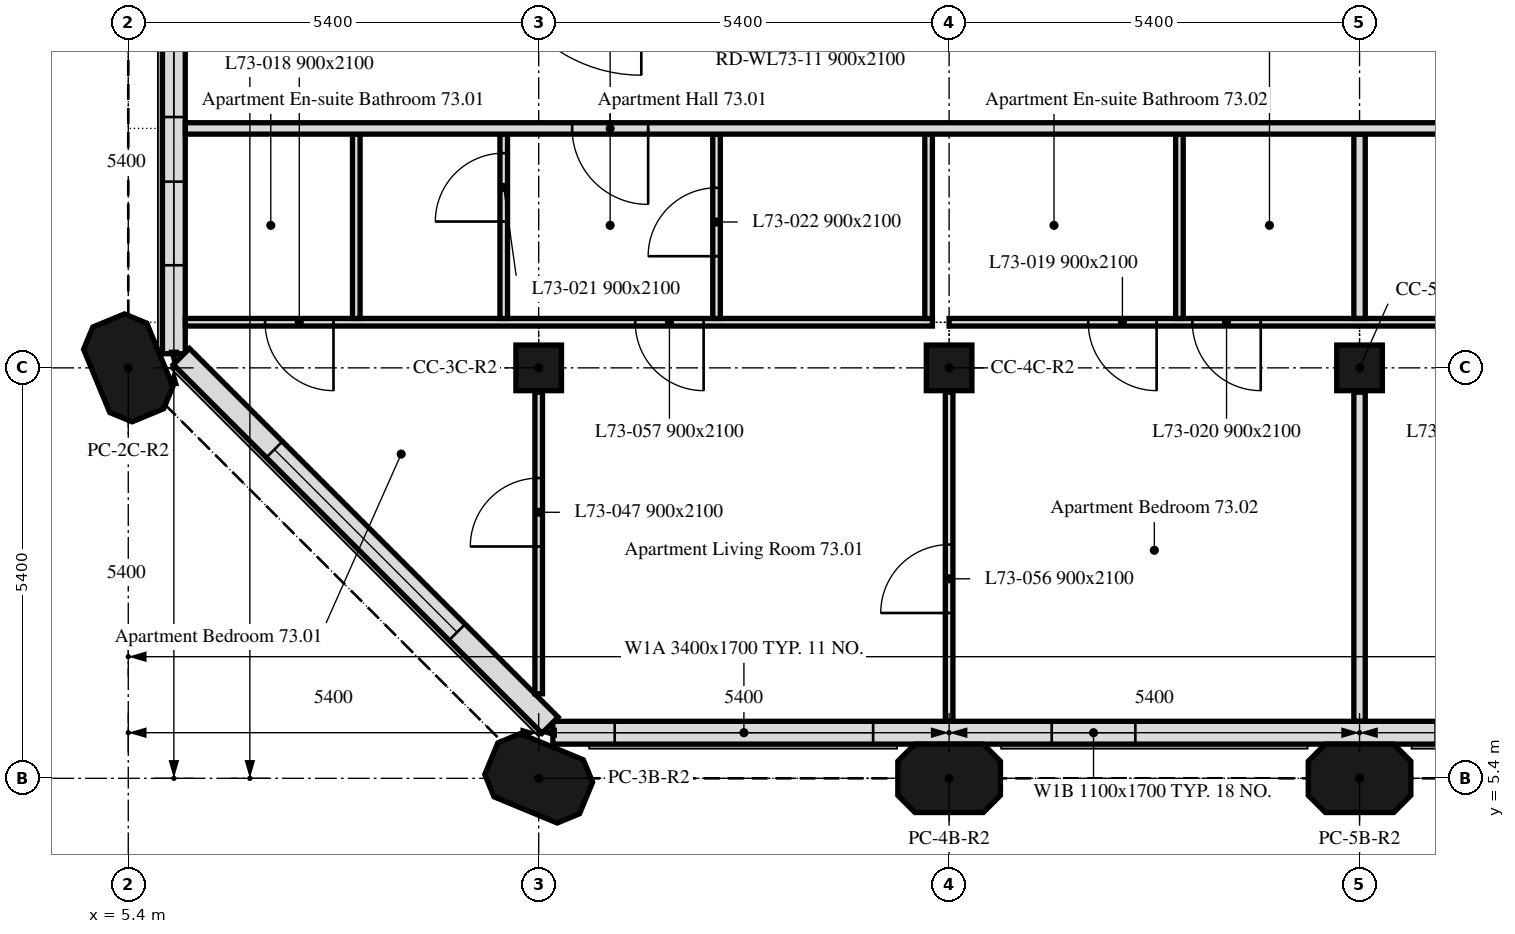
"""IFC4 building model, lengths in metres.
Left out: names, types, materials, properties, quantities, classifications, styles, units other than length and angle.
Written with IfcOpenShell. Run it as: python <this file> out.ifc"""

import sys

from ifc_helpers import new_model, si_unit, direction, frame, frame_2d, origin, origin_2d, place, context, subcontext, project, spatial, polyline, rectangle, outline, extrude, element, fill, save


model = new_model("IFC4")
c1 = context("Model", 3, precision=1e-05, world=origin(), true_north=direction((0.0, 1.0)))
c2 = subcontext(c1, "Body", "Model", "MODEL_VIEW")
j1 = project(units=[si_unit("LENGTHUNIT", "METRE"), si_unit("PLANEANGLEUNIT", "RADIAN")], contexts=[c1])
p1 = place(None, origin())
s1 = spatial("IfcSite", under=j1, at=p1, CompositionType="ELEMENT")
p2 = place(p1, origin())
s2 = spatial("IfcBuilding", under=s1, at=p2, CompositionType="ELEMENT")
p3 = place(p2, frame((0.0, 0.0, 295.0)))
s3 = spatial("IfcBuildingStorey", under=s2, at=p3, CompositionType="ELEMENT", Elevation=295.0)
for number, where, z_axis, x_axis in (
    (1, (10.8, 5.4, 0.0), (0.0, 0.0, 1.0), (-0.924, 0.383, 0.0)),
    (2, (16.2, 5.4, 0.0), (0.0, 0.0, 1.0), (1.0, 0.0, 0.0)),
    (3, (21.6, 5.4, 0.0), (0.0, 0.0, 1.0), (1.0, 0.0, 0.0)),
    (4, (5.4, 10.8, 0.0), (0.0, 0.0, 1.0), (-0.383, 0.924, 0.0)),
):
    element("IfcColumn", number, at=place(p3, frame(where, z_axis=z_axis, x_axis=x_axis)), inside=s3, PredefinedType="COLUMN", context=c2, shape_type="SweptSolid", body=[
        extrude(outline(polyline([(-0.45, -0.45), (0.45, -0.45), (0.675, -0.225), (0.675, 0.225), (0.45, 0.45), (-0.45, 0.45), (-0.675, 0.225), (-0.675, -0.225), (-0.45, -0.45)])), origin(), (0.0, 0.0, 1.0), 3.0),
    ])
for number, where, z_axis, x_axis in (
    (5, (10.8, 10.8, 0.0), (0.0, 0.0, 1.0), (1.0, 0.0, 0.0)),
    (6, (16.2, 10.8, 0.0), (0.0, 0.0, 1.0), (1.0, 0.0, 0.0)),
    (7, (21.6, 10.8, 0.0), (0.0, 0.0, 1.0), (1.0, 0.0, 0.0)),
):
    element("IfcColumn", number, at=place(p3, frame(where, z_axis=z_axis, x_axis=x_axis)), inside=s3, PredefinedType="COLUMN", context=c2, shape_type="SweptSolid", body=[
        extrude(rectangle(XDim=0.6, YDim=0.6, at=origin_2d()), origin(), (0.0, 0.0, 1.0), 3.0),
    ])
p4 = place(p3, frame((10.986, 6.0, 0.0), z_axis=(0.0, 0.0, 1.0), x_axis=(1.0, 0.0, 0.0)))
e8 = element("IfcWall", 8, at=p4, inside=s3, PredefinedType="SOLIDWALL", context=c2, shape_type="SweptSolid", body=[
    extrude(rectangle(XDim=32.027, YDim=0.3, at=frame_2d((16.014, 0.0))), origin(), (0.0, 0.0, 1.0), 3.0),
])
p5 = place(p4, frame((0.814, 0.0, 0.9)))
e9 = element("IfcOpeningElement", 9, at=p5, cuts=e8, PredefinedType="OPENING", context=c2, shape_type="SweptSolid", body=[
    extrude(rectangle(XDim=3.4, YDim=1.7, at=frame_2d((1.7, 0.85))), frame((0.0, 0.16, 0.0), z_axis=(0.0, -1.0, 0.0), x_axis=(1.0, 0.0, 0.0)), (0.0, 0.0, 1.0), 0.32),
])
p6 = place(p4, frame((6.564, 0.0, 0.9)))
e10 = element("IfcOpeningElement", 10, at=p6, cuts=e8, PredefinedType="OPENING", context=c2, shape_type="SweptSolid", body=[
    extrude(rectangle(XDim=1.1, YDim=1.7, at=frame_2d((0.55, 0.85))), frame((0.0, 0.16, 0.0), z_axis=(0.0, -1.0, 0.0), x_axis=(1.0, 0.0, 0.0)), (0.0, 0.0, 1.0), 0.32),
])
p7 = place(p4, frame((11.614, 0.0, 0.9)))
e11 = element("IfcOpeningElement", 11, at=p7, cuts=e8, PredefinedType="OPENING", context=c2, shape_type="SweptSolid", body=[
    extrude(rectangle(XDim=3.4, YDim=1.7, at=frame_2d((1.7, 0.85))), frame((0.0, 0.16, 0.0), z_axis=(0.0, -1.0, 0.0), x_axis=(1.0, 0.0, 0.0)), (0.0, 0.0, 1.0), 0.32),
])
p8 = place(p4, frame((17.364, 0.0, 0.9)))
e12 = element("IfcOpeningElement", 12, at=p8, cuts=e8, PredefinedType="OPENING", context=c2, shape_type="SweptSolid", body=[
    extrude(rectangle(XDim=1.1, YDim=1.7, at=frame_2d((0.55, 0.85))), frame((0.0, 0.16, 0.0), z_axis=(0.0, -1.0, 0.0), x_axis=(1.0, 0.0, 0.0)), (0.0, 0.0, 1.0), 0.32),
])
p9 = place(p4, frame((22.414, 0.0, 0.9)))
e13 = element("IfcOpeningElement", 13, at=p9, cuts=e8, PredefinedType="OPENING", context=c2, shape_type="SweptSolid", body=[
    extrude(rectangle(XDim=3.4, YDim=1.7, at=frame_2d((1.7, 0.85))), frame((0.0, 0.16, 0.0), z_axis=(0.0, -1.0, 0.0), x_axis=(1.0, 0.0, 0.0)), (0.0, 0.0, 1.0), 0.32),
])
p10 = place(p4, frame((28.164, 0.0, 0.9)))
e14 = element("IfcOpeningElement", 14, at=p10, cuts=e8, PredefinedType="OPENING", context=c2, shape_type="SweptSolid", body=[
    extrude(rectangle(XDim=1.1, YDim=1.7, at=frame_2d((0.55, 0.85))), frame((0.0, 0.16, 0.0), z_axis=(0.0, -1.0, 0.0), x_axis=(1.0, 0.0, 0.0)), (0.0, 0.0, 1.0), 0.32),
])
p11 = place(p3, frame((6.0, 16.2, 0.0), z_axis=(0.0, 0.0, 1.0), x_axis=(0.0, -1.0, 0.0)))
e15 = element("IfcWall", 15, at=p11, inside=s3, PredefinedType="SOLIDWALL", context=c2, shape_type="SweptSolid", body=[
    extrude(rectangle(XDim=5.214, YDim=0.3, at=frame_2d((2.607, 0.0))), origin(), (0.0, 0.0, 1.0), 3.0),
])
p12 = place(p11, frame((1.0, 0.0, 0.9)))
e16 = element("IfcOpeningElement", 16, at=p12, cuts=e15, PredefinedType="OPENING", context=c2, shape_type="SweptSolid", body=[
    extrude(rectangle(XDim=1.1, YDim=1.7, at=frame_2d((0.55, 0.85))), frame((0.0, 0.16, 0.0), z_axis=(0.0, -1.0, 0.0), x_axis=(1.0, 0.0, 0.0)), (0.0, 0.0, 1.0), 0.32),
])
p13 = place(p11, frame((2.95, 0.0, 0.9)))
e17 = element("IfcOpeningElement", 17, at=p13, cuts=e15, PredefinedType="OPENING", context=c2, shape_type="SweptSolid", body=[
    extrude(rectangle(XDim=1.1, YDim=1.7, at=frame_2d((0.55, 0.85))), frame((0.0, 0.16, 0.0), z_axis=(0.0, -1.0, 0.0), x_axis=(1.0, 0.0, 0.0)), (0.0, 0.0, 1.0), 0.32),
])
p14 = place(p3, frame((6.099, 10.949, 0.0), z_axis=(0.0, 0.0, 1.0), x_axis=(0.707106781187, -0.707106781187, 0.0)))
e18 = element("IfcWall", 18, at=p14, inside=s3, PredefinedType="SOLIDWALL", context=c2, shape_type="SweptSolid", body=[
    extrude(rectangle(XDim=6.86, YDim=0.3, at=frame_2d((3.43, 0.0))), origin(), (0.0, 0.0, 1.0), 3.0),
])
p15 = place(p14, frame((1.73, 0.0, 0.9)))
e19 = element("IfcOpeningElement", 19, at=p15, cuts=e18, PredefinedType="OPENING", context=c2, shape_type="SweptSolid", body=[
    extrude(rectangle(XDim=3.4, YDim=1.7, at=frame_2d((1.7, 0.85))), frame((0.0, 0.16, 0.0), z_axis=(0.0, -1.0, 0.0), x_axis=(1.0, 0.0, 0.0)), (0.0, 0.0, 1.0), 0.32),
])
p16 = place(p3, frame((10.8, 6.512, 0.0), z_axis=(0.0, 0.0, 1.0), x_axis=(0.0, 1.0, 0.0)))
e20 = element("IfcWall", 20, at=p16, inside=s3, PredefinedType="PARTITIONING", context=c2, shape_type="SweptSolid", body=[
    extrude(rectangle(XDim=3.968, YDim=0.1, at=frame_2d((1.984, 0.0))), origin(), (0.0, 0.0, 1.0), 3.0),
])
p17 = place(p16, frame((1.938, 0.0, 0.0)))
e21 = element("IfcOpeningElement", 21, at=p17, cuts=e20, PredefinedType="OPENING", context=c2, shape_type="SweptSolid", body=[
    extrude(rectangle(XDim=0.9, YDim=2.1, at=frame_2d((0.45, 1.05))), frame((0.0, 0.05, 0.0), z_axis=(0.0, -1.0, 0.0), x_axis=(1.0, 0.0, 0.0)), (0.0, 0.0, 1.0), 0.1),
])
p18 = place(p3, frame((15.98, 11.4, 0.0), z_axis=(0.0, 0.0, 1.0), x_axis=(-1.0, 0.0, 0.0)))
e22 = element("IfcWall", 22, at=p18, inside=s3, PredefinedType="PARTITIONING", context=c2, shape_type="SweptSolid", body=[
    extrude(rectangle(XDim=9.829, YDim=0.1, at=frame_2d((4.915, 0.0))), origin(), (0.0, 0.0, 1.0), 3.0),
])
p19 = place(p18, frame((7.88, 0.0, 0.0)))
e23 = element("IfcOpeningElement", 23, at=p19, cuts=e22, PredefinedType="OPENING", context=c2, shape_type="SweptSolid", body=[
    extrude(rectangle(XDim=0.9, YDim=2.1, at=frame_2d((0.45, 1.05))), frame((0.0, 0.05, 0.0), z_axis=(0.0, -1.0, 0.0), x_axis=(1.0, 0.0, 0.0)), (0.0, 0.0, 1.0), 0.1),
])
p20 = place(p18, frame((3.01, 0.0, 0.0)))
e24 = element("IfcOpeningElement", 24, at=p20, cuts=e22, PredefinedType="OPENING", context=c2, shape_type="SweptSolid", body=[
    extrude(rectangle(XDim=0.9, YDim=2.1, at=frame_2d((0.45, 1.05))), frame((0.0, 0.05, 0.0), z_axis=(0.0, -1.0, 0.0), x_axis=(1.0, 0.0, 0.0)), (0.0, 0.0, 1.0), 0.1),
])
p21 = place(p3, frame((16.2, 6.151, 0.0), z_axis=(0.0, 0.0, 1.0), x_axis=(0.0, 1.0, 0.0)))
e25 = element("IfcWall", 25, at=p21, inside=s3, PredefinedType="PARTITIONING", context=c2, shape_type="SweptSolid", body=[
    extrude(rectangle(XDim=4.329, YDim=0.1, at=frame_2d((2.165, 0.0))), origin(), (0.0, 0.0, 1.0), 3.0),
])
p22 = place(p21, frame((1.424, 0.0, 0.0)))
e26 = element("IfcOpeningElement", 26, at=p22, cuts=e25, PredefinedType="OPENING", context=c2, shape_type="SweptSolid", body=[
    extrude(rectangle(XDim=0.9, YDim=2.1, at=frame_2d((0.45, 1.05))), frame((0.0, 0.05, 0.0), z_axis=(0.0, -1.0, 0.0), x_axis=(1.0, 0.0, 0.0)), (0.0, 0.0, 1.0), 0.1),
])
p23 = place(p3, frame((21.6, 6.151, 0.0), z_axis=(0.0, 0.0, 1.0), x_axis=(0.0, 1.0, 0.0)))
e27 = element("IfcWall", 27, at=p23, inside=s3, PredefinedType="PARTITIONING", context=c2, shape_type="SweptSolid", body=[
    extrude(rectangle(XDim=4.329, YDim=0.15, at=frame_2d((2.165, 0.0))), origin(), (0.0, 0.0, 1.0), 3.0),
])
p24 = place(p3, frame((37.8, 11.4, 0.0), z_axis=(0.0, 0.0, 1.0), x_axis=(-1.0, 0.0, 0.0)))
e28 = element("IfcWall", 28, at=p24, inside=s3, PredefinedType="PARTITIONING", context=c2, shape_type="SweptSolid", body=[
    extrude(rectangle(XDim=21.6, YDim=0.1, at=frame_2d((10.8, 0.0))), origin(), (0.0, 0.0, 1.0), 3.0),
])
p25 = place(p24, frame((18.87, 0.0, 0.0)))
e29 = element("IfcOpeningElement", 29, at=p25, cuts=e28, PredefinedType="OPENING", context=c2, shape_type="SweptSolid", body=[
    extrude(rectangle(XDim=0.9, YDim=2.1, at=frame_2d((0.45, 1.05))), frame((0.0, 0.05, 0.0), z_axis=(0.0, -1.0, 0.0), x_axis=(1.0, 0.0, 0.0)), (0.0, 0.0, 1.0), 0.1),
])
p26 = place(p24, frame((17.5, 0.0, 0.0)))
e30 = element("IfcOpeningElement", 30, at=p26, cuts=e28, PredefinedType="OPENING", context=c2, shape_type="SweptSolid", body=[
    extrude(rectangle(XDim=0.9, YDim=2.1, at=frame_2d((0.45, 1.05))), frame((0.0, 0.05, 0.0), z_axis=(0.0, -1.0, 0.0), x_axis=(1.0, 0.0, 0.0)), (0.0, 0.0, 1.0), 0.1),
])
p27 = place(p24, frame((6.917, 0.0, 0.0)))
e31 = element("IfcOpeningElement", 31, at=p27, cuts=e28, PredefinedType="OPENING", context=c2, shape_type="SweptSolid", body=[
    extrude(rectangle(XDim=0.9, YDim=2.1, at=frame_2d((0.45, 1.05))), frame((0.0, 0.05, 0.0), z_axis=(0.0, -1.0, 0.0), x_axis=(1.0, 0.0, 0.0)), (0.0, 0.0, 1.0), 0.1),
])
p28 = place(p24, frame((3.15, 0.0, 0.0)))
e32 = element("IfcOpeningElement", 32, at=p28, cuts=e28, PredefinedType="OPENING", context=c2, shape_type="SweptSolid", body=[
    extrude(rectangle(XDim=0.9, YDim=2.1, at=frame_2d((0.45, 1.05))), frame((0.0, 0.05, 0.0), z_axis=(0.0, -1.0, 0.0), x_axis=(1.0, 0.0, 0.0)), (0.0, 0.0, 1.0), 0.1),
])
p29 = place(p24, frame((14.158, 0.0, 0.0)))
e33 = element("IfcOpeningElement", 33, at=p29, cuts=e28, PredefinedType="OPENING", context=c2, shape_type="SweptSolid", body=[
    extrude(rectangle(XDim=0.9, YDim=2.1, at=frame_2d((0.45, 1.05))), frame((0.0, 0.05, 0.0), z_axis=(0.0, -1.0, 0.0), x_axis=(1.0, 0.0, 0.0)), (0.0, 0.0, 1.0), 0.1),
])
p30 = place(p24, frame((12.788, 0.0, 0.0)))
e34 = element("IfcOpeningElement", 34, at=p30, cuts=e28, PredefinedType="OPENING", context=c2, shape_type="SweptSolid", body=[
    extrude(rectangle(XDim=0.9, YDim=2.1, at=frame_2d((0.45, 1.05))), frame((0.0, 0.05, 0.0), z_axis=(0.0, -1.0, 0.0), x_axis=(1.0, 0.0, 0.0)), (0.0, 0.0, 1.0), 0.1),
])
p31 = place(p3, frame((8.4, 11.45, 0.0), z_axis=(0.0, 0.0, 1.0), x_axis=(0.0, 1.0, 0.0)))
e35 = element("IfcWall", 35, at=p31, inside=s3, PredefinedType="PARTITIONING", context=c2, shape_type="SweptSolid", body=[
    extrude(rectangle(XDim=2.425, YDim=0.1, at=frame_2d((1.212, 0.0))), origin(), (0.0, 0.0, 1.0), 3.0),
])
p32 = place(p3, frame((10.34, 11.45, 0.0), z_axis=(0.0, 0.0, 1.0), x_axis=(0.0, 1.0, 0.0)))
e36 = element("IfcWall", 36, at=p32, inside=s3, PredefinedType="PARTITIONING", context=c2, shape_type="SweptSolid", body=[
    extrude(rectangle(XDim=2.425, YDim=0.1, at=frame_2d((1.212, 0.0))), origin(), (0.0, 0.0, 1.0), 3.0),
])
p33 = place(p32, frame((1.275, 0.0, 0.0)))
e37 = element("IfcOpeningElement", 37, at=p33, cuts=e36, PredefinedType="OPENING", context=c2, shape_type="SweptSolid", body=[
    extrude(rectangle(XDim=0.9, YDim=2.1, at=frame_2d((0.45, 1.05))), frame((0.0, 0.05, 0.0), z_axis=(0.0, -1.0, 0.0), x_axis=(1.0, 0.0, 0.0)), (0.0, 0.0, 1.0), 0.1),
])
p34 = place(p3, frame((13.14, 11.45, 0.0), z_axis=(0.0, 0.0, 1.0), x_axis=(0.0, 1.0, 0.0)))
e38 = element("IfcWall", 38, at=p34, inside=s3, PredefinedType="PARTITIONING", context=c2, shape_type="SweptSolid", body=[
    extrude(rectangle(XDim=2.425, YDim=0.1, at=frame_2d((1.212, 0.0))), origin(), (0.0, 0.0, 1.0), 3.0),
])
p35 = place(p34, frame((0.819, 0.0, 0.0)))
e39 = element("IfcOpeningElement", 39, at=p35, cuts=e38, PredefinedType="OPENING", context=c2, shape_type="SweptSolid", body=[
    extrude(rectangle(XDim=0.9, YDim=2.1, at=frame_2d((0.45, 1.05))), frame((0.0, 0.05, 0.0), z_axis=(0.0, -1.0, 0.0), x_axis=(1.0, 0.0, 0.0)), (0.0, 0.0, 1.0), 0.1),
])
for number, where, z_axis, x_axis in (
    (40, (15.93, 11.45, 0.0), (0.0, 0.0, 1.0), (0.0, 1.0, 0.0)),
    (41, (19.23, 11.45, 0.0), (0.0, 0.0, 1.0), (0.0, 1.0, 0.0)),
):
    element("IfcWall", number, at=place(p3, frame(where, z_axis=z_axis, x_axis=x_axis)), inside=s3, PredefinedType="PARTITIONING", context=c2, shape_type="SweptSolid", body=[
        extrude(rectangle(XDim=2.425, YDim=0.1, at=frame_2d((1.212, 0.0))), origin(), (0.0, 0.0, 1.0), 3.0),
    ])
p36 = place(p3, frame((21.6, 11.45, 0.0), z_axis=(0.0, 0.0, 1.0), x_axis=(0.0, 1.0, 0.0)))
e42 = element("IfcWall", 42, at=p36, inside=s3, PredefinedType="PARTITIONING", context=c2, shape_type="SweptSolid", body=[
    extrude(rectangle(XDim=2.425, YDim=0.15, at=frame_2d((1.212, 0.0))), origin(), (0.0, 0.0, 1.0), 3.0),
])
p37 = place(p3, frame((47.849, 13.95, 0.0), z_axis=(0.0, 0.0, 1.0), x_axis=(-1.0, 0.0, 0.0)))
e43 = element("IfcWall", 43, at=p37, inside=s3, PredefinedType="PARTITIONING", context=c2, shape_type="SweptSolid", body=[
    extrude(rectangle(XDim=41.698, YDim=0.15, at=frame_2d((20.849, 0.0))), origin(), (0.0, 0.0, 1.0), 3.0),
])
p38 = place(p37, frame((35.609, 0.0, 0.0)))
e44 = element("IfcOpeningElement", 44, at=p38, cuts=e43, PredefinedType="OPENING", context=c2, shape_type="SweptSolid", body=[
    extrude(rectangle(XDim=1.0, YDim=2.1, at=frame_2d((0.5, 1.05))), frame((0.0, 0.075, 0.0), z_axis=(0.0, -1.0, 0.0), x_axis=(1.0, 0.0, 0.0)), (0.0, 0.0, 1.0), 0.15),
])
p39 = place(p37, frame((22.354, 0.0, 0.0)))
e45 = element("IfcOpeningElement", 45, at=p39, cuts=e43, PredefinedType="OPENING", context=c2, shape_type="SweptSolid", body=[
    extrude(rectangle(XDim=1.0, YDim=2.1, at=frame_2d((0.5, 1.05))), frame((0.0, 0.075, 0.0), z_axis=(0.0, -1.0, 0.0), x_axis=(1.0, 0.0, 0.0)), (0.0, 0.0, 1.0), 0.15),
])
p40 = place(p37, frame((8.049, 0.0, 0.0)))
e46 = element("IfcOpeningElement", 46, at=p40, cuts=e43, PredefinedType="OPENING", context=c2, shape_type="SweptSolid", body=[
    extrude(rectangle(XDim=1.0, YDim=2.1, at=frame_2d((0.5, 1.05))), frame((0.0, 0.075, 0.0), z_axis=(0.0, -1.0, 0.0), x_axis=(1.0, 0.0, 0.0)), (0.0, 0.0, 1.0), 0.15),
])
p41 = place(p5, origin())
e47 = element("IfcWindow", 47, at=p41, inside=s3, PartitioningType="SINGLE_PANEL", PredefinedType="WINDOW", context=c2, shape_type="SweptSolid", body=[
    extrude(rectangle(XDim=3.4, YDim=1.7, at=frame_2d((1.7, 0.85))), frame((0.0, 0.03, 0.0), z_axis=(0.0, -1.0, 0.0), x_axis=(1.0, 0.0, 0.0)), (0.0, 0.0, 1.0), 0.06),
])
fill(e9, e47)
p42 = place(p6, origin())
e48 = element("IfcWindow", 48, at=p42, inside=s3, PartitioningType="SINGLE_PANEL", PredefinedType="WINDOW", context=c2, shape_type="SweptSolid", body=[
    extrude(rectangle(XDim=1.1, YDim=1.7, at=frame_2d((0.55, 0.85))), frame((0.0, 0.03, 0.0), z_axis=(0.0, -1.0, 0.0), x_axis=(1.0, 0.0, 0.0)), (0.0, 0.0, 1.0), 0.06),
])
fill(e10, e48)
p43 = place(p7, origin())
e49 = element("IfcWindow", 49, at=p43, inside=s3, PartitioningType="SINGLE_PANEL", PredefinedType="WINDOW", context=c2, shape_type="SweptSolid", body=[
    extrude(rectangle(XDim=3.4, YDim=1.7, at=frame_2d((1.7, 0.85))), frame((0.0, 0.03, 0.0), z_axis=(0.0, -1.0, 0.0), x_axis=(1.0, 0.0, 0.0)), (0.0, 0.0, 1.0), 0.06),
])
fill(e11, e49)
p44 = place(p12, origin())
e50 = element("IfcWindow", 50, at=p44, inside=s3, PartitioningType="SINGLE_PANEL", PredefinedType="WINDOW", context=c2, shape_type="SweptSolid", body=[
    extrude(rectangle(XDim=1.1, YDim=1.7, at=frame_2d((0.55, 0.85))), frame((0.0, 0.03, 0.0), z_axis=(0.0, -1.0, 0.0), x_axis=(1.0, 0.0, 0.0)), (0.0, 0.0, 1.0), 0.06),
])
fill(e16, e50)
p45 = place(p13, origin())
e51 = element("IfcWindow", 51, at=p45, inside=s3, PartitioningType="SINGLE_PANEL", PredefinedType="WINDOW", context=c2, shape_type="SweptSolid", body=[
    extrude(rectangle(XDim=1.1, YDim=1.7, at=frame_2d((0.55, 0.85))), frame((0.0, 0.03, 0.0), z_axis=(0.0, -1.0, 0.0), x_axis=(1.0, 0.0, 0.0)), (0.0, 0.0, 1.0), 0.06),
])
fill(e17, e51)
p46 = place(p15, origin())
e52 = element("IfcWindow", 52, at=p46, inside=s3, PartitioningType="SINGLE_PANEL", PredefinedType="WINDOW", context=c2, shape_type="SweptSolid", body=[
    extrude(rectangle(XDim=3.4, YDim=1.7, at=frame_2d((1.7, 0.85))), frame((0.0, 0.03, 0.0), z_axis=(0.0, -1.0, 0.0), x_axis=(1.0, 0.0, 0.0)), (0.0, 0.0, 1.0), 0.06),
])
fill(e19, e52)
p47 = place(p19, origin())
e53 = element("IfcDoor", 53, at=p47, inside=s3, OperationType="SINGLE_SWING_RIGHT", PredefinedType="DOOR", context=c2, shape_type="SweptSolid", body=[
    extrude(rectangle(XDim=0.9, YDim=2.1, at=frame_2d((0.45, 1.05))), frame((0.0, 0.025, 0.0), z_axis=(0.0, -1.0, 0.0), x_axis=(1.0, 0.0, 0.0)), (0.0, 0.0, 1.0), 0.05),
])
fill(e23, e53)
p48 = place(p25, origin())
e54 = element("IfcDoor", 54, at=p48, inside=s3, OperationType="SINGLE_SWING_LEFT", PredefinedType="DOOR", context=c2, shape_type="SweptSolid", body=[
    extrude(rectangle(XDim=0.9, YDim=2.1, at=frame_2d((0.45, 1.05))), frame((0.0, 0.025, 0.0), z_axis=(0.0, -1.0, 0.0), x_axis=(1.0, 0.0, 0.0)), (0.0, 0.0, 1.0), 0.05),
])
fill(e29, e54)
p49 = place(p26, origin())
e55 = element("IfcDoor", 55, at=p49, inside=s3, OperationType="SINGLE_SWING_RIGHT", PredefinedType="DOOR", context=c2, shape_type="SweptSolid", body=[
    extrude(rectangle(XDim=0.9, YDim=2.1, at=frame_2d((0.45, 1.05))), frame((0.0, 0.025, 0.0), z_axis=(0.0, -1.0, 0.0), x_axis=(1.0, 0.0, 0.0)), (0.0, 0.0, 1.0), 0.05),
])
fill(e30, e55)
p50 = place(p33, origin())
e56 = element("IfcDoor", 56, at=p50, inside=s3, OperationType="SINGLE_SWING_RIGHT", PredefinedType="DOOR", context=c2, shape_type="SweptSolid", body=[
    extrude(rectangle(XDim=0.9, YDim=2.1, at=frame_2d((0.45, 1.05))), frame((0.0, 0.025, 0.0), z_axis=(0.0, -1.0, 0.0), x_axis=(1.0, 0.0, 0.0)), (0.0, 0.0, 1.0), 0.05),
])
fill(e37, e56)
p51 = place(p35, origin())
e57 = element("IfcDoor", 57, at=p51, inside=s3, OperationType="SINGLE_SWING_LEFT", PredefinedType="DOOR", context=c2, shape_type="SweptSolid", body=[
    extrude(rectangle(XDim=0.9, YDim=2.1, at=frame_2d((0.45, 1.05))), frame((0.0, 0.025, 0.0), z_axis=(0.0, -1.0, 0.0), x_axis=(1.0, 0.0, 0.0)), (0.0, 0.0, 1.0), 0.05),
])
fill(e39, e57)
p52 = place(p17, origin())
e58 = element("IfcDoor", 58, at=p52, inside=s3, OperationType="SINGLE_SWING_RIGHT", PredefinedType="DOOR", context=c2, shape_type="SweptSolid", body=[
    extrude(rectangle(XDim=0.9, YDim=2.1, at=frame_2d((0.45, 1.05))), frame((0.0, 0.025, 0.0), z_axis=(0.0, -1.0, 0.0), x_axis=(1.0, 0.0, 0.0)), (0.0, 0.0, 1.0), 0.05),
])
fill(e21, e58)
p53 = place(p22, origin())
e59 = element("IfcDoor", 59, at=p53, inside=s3, OperationType="SINGLE_SWING_LEFT", PredefinedType="DOOR", context=c2, shape_type="SweptSolid", body=[
    extrude(rectangle(XDim=0.9, YDim=2.1, at=frame_2d((0.45, 1.05))), frame((0.0, 0.025, 0.0), z_axis=(0.0, -1.0, 0.0), x_axis=(1.0, 0.0, 0.0)), (0.0, 0.0, 1.0), 0.05),
])
fill(e26, e59)
p54 = place(p20, origin())
e60 = element("IfcDoor", 60, at=p54, inside=s3, OperationType="SINGLE_SWING_RIGHT", PredefinedType="DOOR", context=c2, shape_type="SweptSolid", body=[
    extrude(rectangle(XDim=0.9, YDim=2.1, at=frame_2d((0.45, 1.05))), frame((0.0, 0.025, 0.0), z_axis=(0.0, -1.0, 0.0), x_axis=(1.0, 0.0, 0.0)), (0.0, 0.0, 1.0), 0.05),
])
fill(e24, e60)
p55 = place(p38, origin())
e61 = element("IfcDoor", 61, at=p55, inside=s3, OperationType="SINGLE_SWING_RIGHT", PredefinedType="DOOR", context=c2, shape_type="SweptSolid", body=[
    extrude(rectangle(XDim=1.0, YDim=2.1, at=frame_2d((0.5, 1.05))), frame((0.0, 0.025, 0.0), z_axis=(0.0, -1.0, 0.0), x_axis=(1.0, 0.0, 0.0)), (0.0, 0.0, 1.0), 0.05),
])
fill(e44, e61)
save(model, sys.argv[1])
